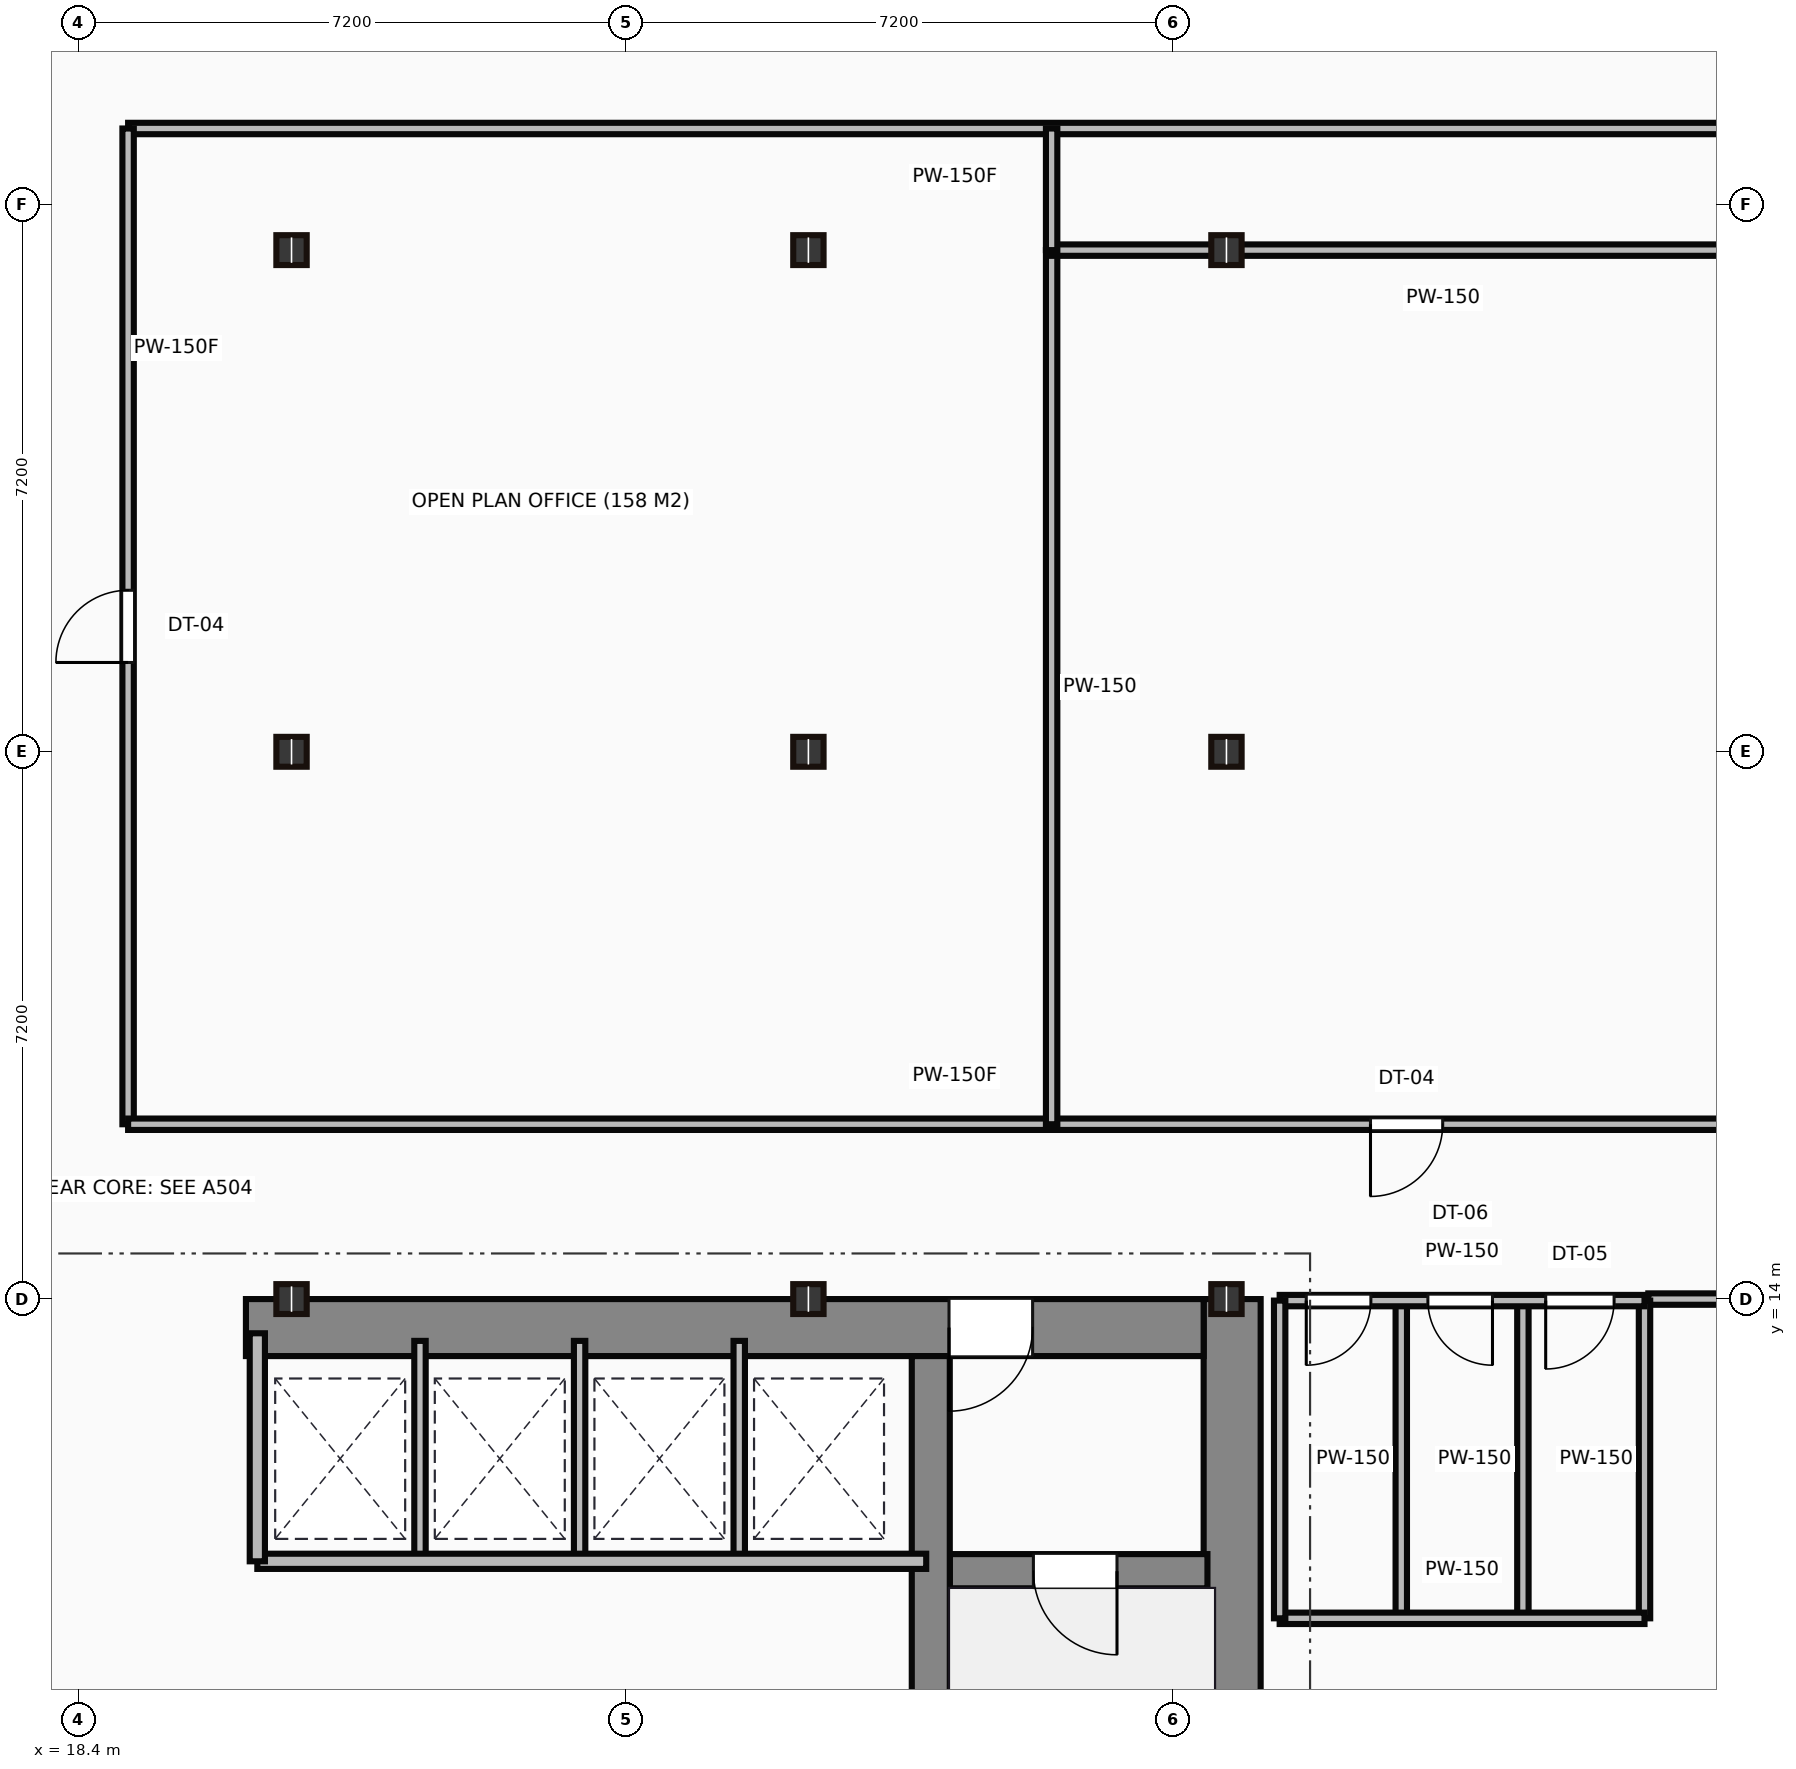
"""IFC4 building model, lengths in metres.
Left out: names, types, materials, properties, quantities, classifications, styles, units other than length and angle.
Written with IfcOpenShell. Run it as: python <this file> out.ifc"""

import sys

from ifc_helpers import new_model, si_unit, direction, frame, frame_2d, origin, origin_2d, place, context, subcontext, project, spatial, rectangle, i_section, extrude, source, transform, mapped, element, fill, save


model = new_model("IFC4")
c1 = context("Model", 3, precision=1e-05, world=origin(), true_north=direction((0.0, 1.0)))
c2 = subcontext(c1, "Body", "Model", "MODEL_VIEW")
j1 = project(units=[si_unit("LENGTHUNIT", "METRE"), si_unit("PLANEANGLEUNIT", "RADIAN")], contexts=[c1])
p1 = place(None, origin())
s1 = spatial("IfcSite", under=j1, at=p1, CompositionType="ELEMENT")
p2 = place(p1, origin())
s2 = spatial("IfcBuilding", under=s1, at=p2, CompositionType="ELEMENT")
p3 = place(p2, frame((0.0, 0.0, 92.3)))
s3 = spatial("IfcBuildingStorey", under=s2, at=p3, CompositionType="ELEMENT", Elevation=92.3)
m1 = source(origin(), c2, "Body", "SweptSolid", [
    extrude(rectangle(XDim=13.1, YDim=0.75, at=frame_2d((6.55, 0.0))), origin(), (0.0, 0.0, 1.0), 3.65),
])
p4 = place(p3, frame((33.575, 0.9, 0.0), z_axis=(0.0, 0.0, 1.0), x_axis=(0.0, 1.0, 0.0)))
e1 = element("IfcWall", 1, at=p4, inside=s3, PredefinedType="SHEAR", context=c2, shape_type="MappedRepresentation", body=[
    mapped(m1, transform((0.0, 0.0, 0.0))),
])
m2 = source(origin(), c2, "Body", "SweptSolid", [
    extrude(rectangle(XDim=12.6, YDim=0.75, at=frame_2d((6.3, 0.0))), origin(), (0.0, 0.0, 1.0), 3.65),
])
p5 = place(p3, frame((20.6, 13.625, 0.0), z_axis=(0.0, 0.0, 1.0), x_axis=(1.0, 0.0, 0.0)))
e2 = element("IfcWall", 2, at=p5, inside=s3, PredefinedType="SHEAR", context=c2, shape_type="MappedRepresentation", body=[
    mapped(m2, transform((0.0, 0.0, 0.0))),
])
p6 = place(p5, frame((9.25, 0.0, 0.0)))
e3 = element("IfcOpeningElement", 3, at=p6, cuts=e2, PredefinedType="OPENING", context=c2, shape_type="SweptSolid", body=[
    extrude(rectangle(XDim=1.1, YDim=2.15, at=frame_2d((0.55, 1.075))), frame((0.0, 0.385, 0.0), z_axis=(0.0, -1.0, 0.0), x_axis=(1.0, 0.0, 0.0)), (0.0, 0.0, 1.0), 0.77),
])
m3 = source(origin(), c2, "Body", "SweptSolid", [
    extrude(rectangle(XDim=12.35, YDim=0.5, at=frame_2d((6.175, 0.0))), origin(), (0.0, 0.0, 1.0), 3.65),
])
p7 = place(p3, frame((29.61, 0.9, 0.0), z_axis=(0.0, 0.0, 1.0), x_axis=(0.0, 1.0, 0.0)))
e4 = element("IfcWall", 4, at=p7, inside=s3, PredefinedType="SHEAR", context=c2, shape_type="MappedRepresentation", body=[
    mapped(m3, transform((0.0, 0.0, 0.0))),
])
m4 = source(origin(), c2, "Body", "SweptSolid", [
    extrude(rectangle(XDim=3.39, YDim=0.45, at=frame_2d((1.695, 0.0))), origin(), (0.0, 0.0, 1.0), 3.65),
])
p8 = place(p3, frame((29.86, 10.42, 0.0), z_axis=(0.0, 0.0, 1.0), x_axis=(1.0, 0.0, 0.0)))
e5 = element("IfcWall", 5, at=p8, inside=s3, PredefinedType="SHEAR", context=c2, shape_type="MappedRepresentation", body=[
    mapped(m4, transform((0.0, 0.0, 0.0))),
])
p9 = place(p8, frame((1.1, 0.0, 0.0)))
e6 = element("IfcOpeningElement", 6, at=p9, cuts=e5, PredefinedType="OPENING", context=c2, shape_type="SweptSolid", body=[
    extrude(rectangle(XDim=1.1, YDim=2.15, at=frame_2d((0.55, 1.075))), frame((0.0, 0.235, 0.0), z_axis=(0.0, -1.0, 0.0), x_axis=(1.0, 0.0, 0.0)), (0.0, 0.0, 1.0), 0.47),
])
m5 = source(origin(), c2, "Body", "SweptSolid", [
    extrude(i_section(OverallWidth=0.399, OverallDepth=0.393, WebThickness=0.023, FlangeThickness=0.037, at=origin_2d()), origin(), (0.0, 0.0, 1.0), 3.65),
])
for number, where, z_axis, x_axis in (
    (7, (21.2, 14.0, 0.0), (0.0, 0.0, 1.0), (1.0, 0.0, 0.0)),
    (8, (21.2, 21.2, 0.0), (0.0, 0.0, 1.0), (1.0, 0.0, 0.0)),
    (9, (21.2, 27.8, 0.0), (0.0, 0.0, 1.0), (1.0, 0.0, 0.0)),
    (10, (28.0, 14.0, 0.0), (0.0, 0.0, 1.0), (1.0, 0.0, 0.0)),
    (11, (28.0, 21.2, 0.0), (0.0, 0.0, 1.0), (1.0, 0.0, 0.0)),
    (12, (28.0, 27.8, 0.0), (0.0, 0.0, 1.0), (1.0, 0.0, 0.0)),
    (13, (33.5, 14.0, 0.0), (0.0, 0.0, 1.0), (1.0, 0.0, 0.0)),
    (14, (33.5, 21.2, 0.0), (0.0, 0.0, 1.0), (1.0, 0.0, 0.0)),
    (15, (33.5, 27.8, 0.0), (0.0, 0.0, 1.0), (1.0, 0.0, 0.0)),
):
    element("IfcColumn", number, at=place(p3, frame(where, z_axis=z_axis, x_axis=x_axis)), inside=s3, PredefinedType="COLUMN", context=c2, shape_type="MappedRepresentation", body=[
        mapped(m5, transform((0.0, 0.0, 0.0))),
    ])
m6 = source(origin(), c2, "Body", "SweptSolid", [
    extrude(rectangle(XDim=8.8, YDim=0.2, at=frame_2d((4.4, 0.0))), origin(), (0.0, 0.0, 1.0), 3.4),
])
p10 = place(p3, frame((20.75, 10.55, 0.0), z_axis=(0.0, 0.0, 1.0), x_axis=(1.0, 0.0, 0.0)))
e16 = element("IfcWall", 16, at=p10, inside=s3, PredefinedType="PARTITIONING", context=c2, shape_type="MappedRepresentation", body=[
    mapped(m6, transform((0.0, 0.0, 0.0))),
])
m7 = source(origin(), c2, "Body", "SweptSolid", [
    extrude(rectangle(XDim=3.0, YDim=0.2, at=frame_2d((1.5, 0.0))), origin(), (0.0, 0.0, 1.0), 3.4),
])
p11 = place(p3, frame((20.75, 10.55, 0.0), z_axis=(0.0, 0.0, 1.0), x_axis=(0.0, 1.0, 0.0)))
e17 = element("IfcWall", 17, at=p11, inside=s3, PredefinedType="PARTITIONING", context=c2, shape_type="MappedRepresentation", body=[
    mapped(m7, transform((0.0, 0.0, 0.0))),
])
m8 = source(origin(), c2, "Body", "SweptSolid", [
    extrude(rectangle(XDim=2.85, YDim=0.15, at=frame_2d((1.425, 0.0))), origin(), (0.0, 0.0, 1.0), 3.4),
])
for number, where, z_axis, x_axis in (
    (18, (22.89, 10.6, 0.0), (0.0, 0.0, 1.0), (0.0, 1.0, 0.0)),
    (19, (24.99, 10.6, 0.0), (0.0, 0.0, 1.0), (0.0, 1.0, 0.0)),
    (20, (27.09, 10.6, 0.0), (0.0, 0.0, 1.0), (0.0, 1.0, 0.0)),
):
    element("IfcWall", number, at=place(p3, frame(where, z_axis=z_axis, x_axis=x_axis)), inside=s3, PredefinedType="PARTITIONING", context=c2, shape_type="MappedRepresentation", body=[
        mapped(m8, transform((0.0, 0.0, 0.0))),
    ])
m9 = source(origin(), c2, "Body", "SweptSolid", [
    extrude(rectangle(XDim=4.8, YDim=0.15, at=frame_2d((2.4, 0.0))), origin(), (0.0, 0.0, 1.0), 2.702),
])
p12 = place(p3, frame((34.2, 13.98, 0.0), z_axis=(0.0, 0.0, 1.0), x_axis=(1.0, 0.0, 0.0)))
e21 = element("IfcWall", 21, at=p12, inside=s3, PredefinedType="PARTITIONING", context=c2, shape_type="MappedRepresentation", body=[
    mapped(m9, transform((0.0, 0.0, 0.0))),
])
p13 = place(p12, frame((0.35, 0.0, 0.0)))
e22 = element("IfcOpeningElement", 22, at=p13, cuts=e21, PredefinedType="OPENING", context=c2, shape_type="SweptSolid", body=[
    extrude(rectangle(XDim=0.85, YDim=2.1, at=frame_2d((0.425, 1.05))), frame((0.0, 0.085, 0.0), z_axis=(0.0, -1.0, 0.0), x_axis=(1.0, 0.0, 0.0)), (0.0, 0.0, 1.0), 0.17),
])
p14 = place(p12, frame((1.95, 0.0, 0.0)))
e23 = element("IfcOpeningElement", 23, at=p14, cuts=e21, PredefinedType="OPENING", context=c2, shape_type="SweptSolid", body=[
    extrude(rectangle(XDim=0.85, YDim=2.1, at=frame_2d((0.425, 1.05))), frame((0.0, 0.085, 0.0), z_axis=(0.0, -1.0, 0.0), x_axis=(1.0, 0.0, 0.0)), (0.0, 0.0, 1.0), 0.17),
])
p15 = place(p12, frame((3.5, 0.0, 0.0)))
e24 = element("IfcOpeningElement", 24, at=p15, cuts=e21, PredefinedType="OPENING", context=c2, shape_type="SweptSolid", body=[
    extrude(rectangle(XDim=0.9, YDim=2.1, at=frame_2d((0.45, 1.05))), frame((0.0, 0.085, 0.0), z_axis=(0.0, -1.0, 0.0), x_axis=(1.0, 0.0, 0.0)), (0.0, 0.0, 1.0), 0.17),
])
m10 = source(origin(), c2, "Body", "SweptSolid", [
    extrude(rectangle(XDim=4.8, YDim=0.15, at=frame_2d((2.4, 0.0))), origin(), (0.0, 0.0, 1.0), 3.4),
])
p16 = place(p3, frame((34.2, 9.8, 0.0), z_axis=(0.0, 0.0, 1.0), x_axis=(1.0, 0.0, 0.0)))
e25 = element("IfcWall", 25, at=p16, inside=s3, PredefinedType="PARTITIONING", context=c2, shape_type="MappedRepresentation", body=[
    mapped(m10, transform((0.0, 0.0, 0.0))),
])
m11 = source(origin(), c2, "Body", "SweptSolid", [
    extrude(rectangle(XDim=4.18, YDim=0.15, at=frame_2d((2.09, 0.0))), origin(), (0.0, 0.0, 1.0), 3.4),
])
for number, where, z_axis, x_axis in (
    (26, (39.0, 9.8, 0.0), (0.0, 0.0, 1.0), (0.0, 1.0, 0.0)),
    (27, (34.2, 9.8, 0.0), (0.0, 0.0, 1.0), (0.0, 1.0, 0.0)),
    (28, (35.8, 9.8, 0.0), (0.0, 0.0, 1.0), (0.0, 1.0, 0.0)),
    (29, (37.4, 9.8, 0.0), (0.0, 0.0, 1.0), (0.0, 1.0, 0.0)),
):
    element("IfcWall", number, at=place(p3, frame(where, z_axis=z_axis, x_axis=x_axis)), inside=s3, PredefinedType="PARTITIONING", context=c2, shape_type="MappedRepresentation", body=[
        mapped(m11, transform((0.0, 0.0, 0.0))),
    ])
m12 = source(origin(), c2, "Body", "SweptSolid", [
    extrude(rectangle(XDim=21.75, YDim=0.15, at=frame_2d((10.875, 0.0))), origin(), (0.0, 0.0, 1.0), 3.4),
])
p17 = place(p3, frame((40.8, 29.4, 0.0), z_axis=(0.0, 0.0, 1.0), x_axis=(-1.0, 0.0, 0.0)))
e30 = element("IfcWall", 30, at=p17, inside=s3, PredefinedType="PARTITIONING", context=c2, shape_type="MappedRepresentation", body=[
    mapped(m12, transform((0.0, 0.0, 0.0))),
])
m13 = source(origin(), c2, "Body", "SweptSolid", [
    extrude(rectangle(XDim=13.1, YDim=0.15, at=frame_2d((6.55, 0.0))), origin(), (0.0, 0.0, 1.0), 3.4),
])
p18 = place(p3, frame((19.05, 29.4, 0.0), z_axis=(0.0, 0.0, 1.0), x_axis=(0.0, -1.0, 0.0)))
e31 = element("IfcWall", 31, at=p18, inside=s3, PredefinedType="PARTITIONING", context=c2, shape_type="MappedRepresentation", body=[
    mapped(m13, transform((0.0, 0.0, 0.0))),
])
p19 = place(p18, frame((6.075, 0.0, 0.0)))
e32 = element("IfcOpeningElement", 32, at=p19, cuts=e31, PredefinedType="OPENING", context=c2, shape_type="SweptSolid", body=[
    extrude(rectangle(XDim=0.95, YDim=2.15, at=frame_2d((0.475, 1.075))), frame((0.0, 0.085, 0.0), z_axis=(0.0, -1.0, 0.0), x_axis=(1.0, 0.0, 0.0)), (0.0, 0.0, 1.0), 0.17),
])
p20 = place(p3, frame((19.05, 16.3, 0.0), z_axis=(0.0, 0.0, 1.0), x_axis=(1.0, 0.0, 0.0)))
e33 = element("IfcWall", 33, at=p20, inside=s3, PredefinedType="PARTITIONING", context=c2, shape_type="MappedRepresentation", body=[
    mapped(m12, transform((0.0, 0.0, 0.0))),
])
p21 = place(p20, frame((16.345, 0.0, 0.0)))
e34 = element("IfcOpeningElement", 34, at=p21, cuts=e33, PredefinedType="OPENING", context=c2, shape_type="SweptSolid", body=[
    extrude(rectangle(XDim=0.95, YDim=2.15, at=frame_2d((0.475, 1.075))), frame((0.0, 0.085, 0.0), z_axis=(0.0, -1.0, 0.0), x_axis=(1.0, 0.0, 0.0)), (0.0, 0.0, 1.0), 0.17),
])
m14 = source(origin(), c2, "Body", "SweptSolid", [
    extrude(rectangle(XDim=1.75, YDim=0.15, at=frame_2d((0.875, 0.0))), origin(), (0.0, 0.0, 1.0), 2.702),
])
p22 = place(p3, frame((40.8, 14.0, 0.0), z_axis=(0.0, 0.0, 1.0), x_axis=(-1.0, 0.0, 0.0)))
e35 = element("IfcWall", 35, at=p22, inside=s3, PredefinedType="PARTITIONING", context=c2, shape_type="MappedRepresentation", body=[
    mapped(m14, transform((0.0, 0.0, 0.0))),
])
m15 = source(origin(), c2, "Body", "SweptSolid", [
    extrude(rectangle(XDim=11.5, YDim=0.15, at=frame_2d((5.75, 0.0))), origin(), (0.0, 0.0, 1.0), 3.4),
])
p23 = place(p3, frame((31.2, 27.8, 0.0), z_axis=(0.0, 0.0, 1.0), x_axis=(0.0, -1.0, 0.0)))
e36 = element("IfcWall", 36, at=p23, inside=s3, PredefinedType="PARTITIONING", context=c2, shape_type="MappedRepresentation", body=[
    mapped(m15, transform((0.0, 0.0, 0.0))),
])
m16 = source(origin(), c2, "Body", "SweptSolid", [
    extrude(rectangle(XDim=10.3, YDim=0.15, at=frame_2d((5.15, 0.0))), origin(), (0.0, 0.0, 1.0), 2.702),
])
p24 = place(p3, frame((41.5, 27.8, 0.0), z_axis=(0.0, 0.0, 1.0), x_axis=(-1.0, 0.0, 0.0)))
e37 = element("IfcWall", 37, at=p24, inside=s3, PredefinedType="PARTITIONING", context=c2, shape_type="MappedRepresentation", body=[
    mapped(m16, transform((0.0, 0.0, 0.0))),
])
m17 = source(origin(), c2, "Body", "SweptSolid", [
    extrude(rectangle(XDim=1.6, YDim=0.15, at=frame_2d((0.8, 0.0))), origin(), (0.0, 0.0, 1.0), 3.4),
])
p25 = place(p3, frame((31.2, 29.4, 0.0), z_axis=(0.0, 0.0, 1.0), x_axis=(0.0, -1.0, 0.0)))
e38 = element("IfcWall", 38, at=p25, inside=s3, PredefinedType="PARTITIONING", context=c2, shape_type="MappedRepresentation", body=[
    mapped(m17, transform((0.0, 0.0, 0.0))),
])
m18 = source(origin(), c2, "Body", "SweptSolid", [
    extrude(rectangle(XDim=1.1, YDim=2.15, at=frame_2d((0.55, 1.075))), frame((0.0, 0.025, 0.0), z_axis=(0.0, -1.0, 0.0), x_axis=(1.0, 0.0, 0.0)), (0.0, 0.0, 1.0), 0.05),
])
p26 = place(p9, frame((1.1, 0.0, 0.0), z_axis=(0.0, 0.0, 1.0), x_axis=(-1.0, 0.0, 0.0)))
e39 = element("IfcDoor", 39, at=p26, inside=s3, OperationType="SINGLE_SWING_RIGHT", PredefinedType="DOOR", context=c2, shape_type="MappedRepresentation", body=[
    mapped(m18, transform((0.0, 0.0, 0.0))),
])
fill(e6, e39)
p27 = place(p6, origin())
e40 = element("IfcDoor", 40, at=p27, inside=s3, OperationType="SINGLE_SWING_LEFT", PredefinedType="DOOR", context=c2, shape_type="MappedRepresentation", body=[
    mapped(m18, transform((0.0, 0.0, 0.0))),
])
fill(e3, e40)
m19 = source(origin(), c2, "Body", "SweptSolid", [
    extrude(rectangle(XDim=0.85, YDim=2.1, at=frame_2d((0.425, 1.05))), frame((0.0, 0.025, 0.0), z_axis=(0.0, -1.0, 0.0), x_axis=(1.0, 0.0, 0.0)), (0.0, 0.0, 1.0), 0.05),
])
p28 = place(p13, frame((0.85, 0.0, 0.0), z_axis=(0.0, 0.0, 1.0), x_axis=(-1.0, 0.0, 0.0)))
e41 = element("IfcDoor", 41, at=p28, inside=s3, OperationType="SINGLE_SWING_LEFT", PredefinedType="DOOR", context=c2, shape_type="MappedRepresentation", body=[
    mapped(m19, transform((0.0, 0.0, 0.0))),
])
fill(e22, e41)
p29 = place(p14, frame((0.85, 0.0, 0.0), z_axis=(0.0, 0.0, 1.0), x_axis=(-1.0, 0.0, 0.0)))
e42 = element("IfcDoor", 42, at=p29, inside=s3, OperationType="SINGLE_SWING_RIGHT", PredefinedType="DOOR", context=c2, shape_type="MappedRepresentation", body=[
    mapped(m19, transform((0.0, 0.0, 0.0))),
])
fill(e23, e42)
m20 = source(origin(), c2, "Body", "SweptSolid", [
    extrude(rectangle(XDim=0.9, YDim=2.1, at=frame_2d((0.45, 1.05))), frame((0.0, 0.025, 0.0), z_axis=(0.0, -1.0, 0.0), x_axis=(1.0, 0.0, 0.0)), (0.0, 0.0, 1.0), 0.05),
])
p30 = place(p15, frame((0.9, 0.0, 0.0), z_axis=(0.0, 0.0, 1.0), x_axis=(-1.0, 0.0, 0.0)))
e43 = element("IfcDoor", 43, at=p30, inside=s3, OperationType="SINGLE_SWING_LEFT", PredefinedType="DOOR", context=c2, shape_type="MappedRepresentation", body=[
    mapped(m20, transform((0.0, 0.0, 0.0))),
])
fill(e24, e43)
m21 = source(origin(), c2, "Body", "SweptSolid", [
    extrude(rectangle(XDim=0.95, YDim=2.15, at=frame_2d((0.475, 1.075))), frame((0.0, 0.025, 0.0), z_axis=(0.0, -1.0, 0.0), x_axis=(1.0, 0.0, 0.0)), (0.0, 0.0, 1.0), 0.05),
])
p31 = place(p19, origin())
e44 = element("IfcDoor", 44, at=p31, inside=s3, OperationType="SINGLE_SWING_RIGHT", PredefinedType="DOOR", context=c2, shape_type="MappedRepresentation", body=[
    mapped(m21, transform((0.0, 0.0, 0.0))),
])
fill(e32, e44)
p32 = place(p21, origin())
e45 = element("IfcDoor", 45, at=p32, inside=s3, OperationType="SINGLE_SWING_LEFT", PredefinedType="DOOR", context=c2, shape_type="MappedRepresentation", body=[
    mapped(m21, transform((0.0, 0.0, 0.0))),
])
fill(e34, e45)
save(model, sys.argv[1])
